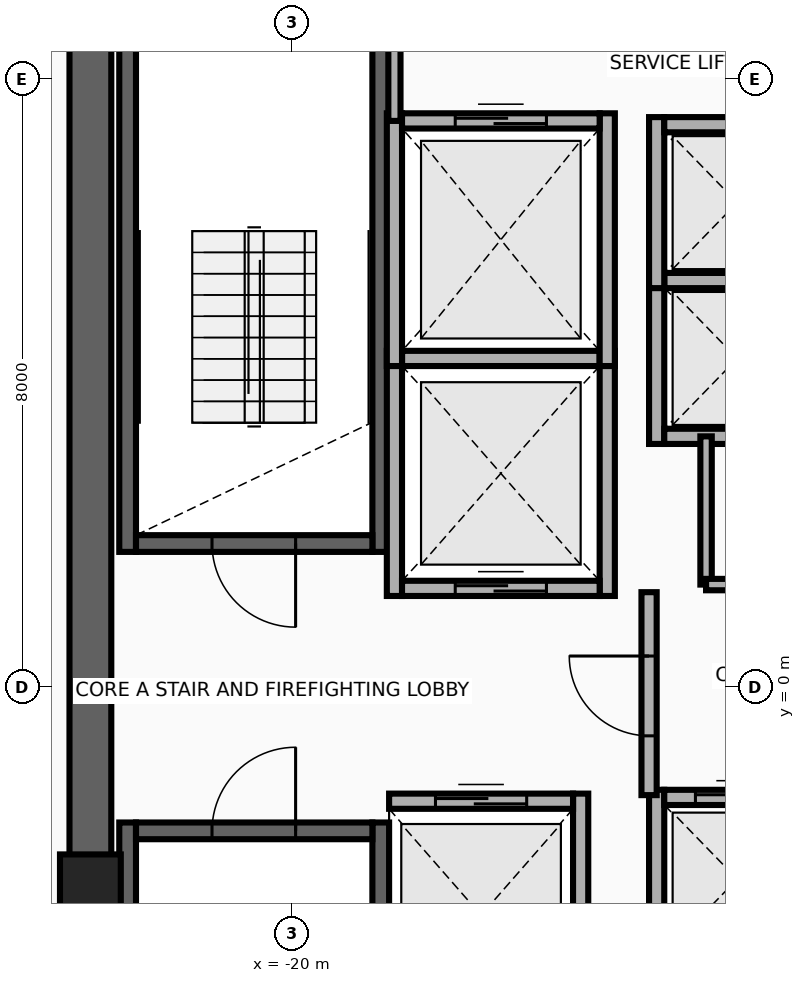
"""IFC4 building model, lengths in metres.
Left out: names, types, materials, properties, quantities, classifications, styles, units other than length and angle.
Written with IfcOpenShell. Run it as: python <this file> out.ifc"""

import sys

from ifc_helpers import new_model, si_unit, direction, frame, frame_2d, origin, origin_2d, place, context, subcontext, project, spatial, rectangle, extrude, source, transform, mapped, element, fill, save


model = new_model("IFC4")
c1 = context("Model", 3, precision=1e-05, world=origin(), true_north=direction((0.0, 1.0)))
c2 = subcontext(c1, "Body", "Model", "MODEL_VIEW")
j1 = project(units=[si_unit("LENGTHUNIT", "METRE"), si_unit("PLANEANGLEUNIT", "RADIAN")], contexts=[c1])
p1 = place(None, origin())
s1 = spatial("IfcSite", under=j1, at=p1, CompositionType="ELEMENT")
p2 = place(p1, origin())
s2 = spatial("IfcBuilding", under=s1, at=p2, CompositionType="ELEMENT")
p3 = place(p2, frame((0.0, 0.0, 251.0)))
s3 = spatial("IfcBuildingStorey", under=s2, at=p3, CompositionType="ELEMENT", Elevation=251.0)
for number, where, z_axis, x_axis in (
    (1, (-22.16, 1.78, 0.0), (0.0, 0.0, 1.0), (0.0, 1.0, 0.0)),
    (2, (-18.83, 1.78, 0.0), (0.0, 0.0, 1.0), (0.0, 1.0, 0.0)),
):
    element("IfcWall", number, at=place(p3, frame(where, z_axis=z_axis, x_axis=x_axis)), inside=s3, PredefinedType="SHEAR", context=c2, shape_type="SweptSolid", body=[
        extrude(rectangle(XDim=8.745, YDim=0.22, at=frame_2d((4.373, 0.0))), origin(), (0.0, 0.0, 1.0), 3.26),
    ])
p4 = place(p3, frame((-22.05, 1.89, 0.0), z_axis=(0.0, 0.0, 1.0), x_axis=(1.0, 0.0, 0.0)))
e3 = element("IfcWall", 3, at=p4, inside=s3, PredefinedType="SHEAR", context=c2, shape_type="SweptSolid", body=[
    extrude(rectangle(XDim=3.11, YDim=0.22, at=frame_2d((1.555, 0.0))), origin(), (0.0, 0.0, 1.0), 3.26),
])
p5 = place(p4, frame((1.0, 0.0, 0.0)))
e4 = element("IfcOpeningElement", 4, at=p5, cuts=e3, PredefinedType="OPENING", context=c2, shape_type="SweptSolid", body=[
    extrude(rectangle(XDim=1.1, YDim=2.15, at=frame_2d((0.55, 1.075))), frame((0.0, 0.125, 0.0), z_axis=(0.0, -1.0, 0.0), x_axis=(1.0, 0.0, 0.0)), (0.0, 0.0, 1.0), 0.25),
])
for number, where, z_axis, x_axis in (
    (5, (-22.16, -10.525, 0.0), (0.0, 0.0, 1.0), (0.0, 1.0, 0.0)),
    (6, (-18.83, -10.525, 0.0), (0.0, 0.0, 1.0), (0.0, 1.0, 0.0)),
):
    element("IfcWall", number, at=place(p3, frame(where, z_axis=z_axis, x_axis=x_axis)), inside=s3, PredefinedType="SHEAR", context=c2, shape_type="SweptSolid", body=[
        extrude(rectangle(XDim=8.745, YDim=0.22, at=frame_2d((4.373, 0.0))), origin(), (0.0, 0.0, 1.0), 3.26),
    ])
p6 = place(p3, frame((-22.05, -1.89, 0.0), z_axis=(0.0, 0.0, 1.0), x_axis=(1.0, 0.0, 0.0)))
e7 = element("IfcWall", 7, at=p6, inside=s3, PredefinedType="SHEAR", context=c2, shape_type="SweptSolid", body=[
    extrude(rectangle(XDim=3.11, YDim=0.22, at=frame_2d((1.555, 0.0))), origin(), (0.0, 0.0, 1.0), 3.26),
])
p7 = place(p6, frame((1.0, 0.0, 0.0)))
e8 = element("IfcOpeningElement", 8, at=p7, cuts=e7, PredefinedType="OPENING", context=c2, shape_type="SweptSolid", body=[
    extrude(rectangle(XDim=1.1, YDim=2.15, at=frame_2d((0.55, 1.075))), frame((0.0, 0.125, 0.0), z_axis=(0.0, -1.0, 0.0), x_axis=(1.0, 0.0, 0.0)), (0.0, 0.0, 1.0), 0.25),
])
p8 = place(p3, frame((-22.65, -11.075, 0.0), z_axis=(0.0, 0.0, 1.0), x_axis=(0.0, 1.0, 0.0)))
e9 = element("IfcWall", 9, at=p8, inside=s3, PredefinedType="SHEAR", context=c2, shape_type="SweptSolid", body=[
    extrude(rectangle(XDim=22.15, YDim=0.55, at=frame_2d((11.075, 0.0))), origin(), (0.0, 0.0, 1.0), 3.26),
])
m1 = source(origin(), c2, "Body", "SweptSolid", [
    extrude(rectangle(XDim=0.8, YDim=0.8, at=origin_2d()), origin(), (0.0, 0.0, 1.0), 3.5),
])
p9 = place(p3, frame((-22.65, -2.6, 0.0), z_axis=(0.0, 0.0, 1.0), x_axis=(1.0, 0.0, 0.0)))
e10 = element("IfcColumn", 10, at=p9, inside=s3, PredefinedType="COLUMN", context=c2, shape_type="MappedRepresentation", body=[
    mapped(m1, transform((0.0, 0.0, 0.0), x_axis=(1.0, 0.0, 0.0), y_axis=(0.0, 1.0, 0.0), z_axis=(0.0, 0.0, 1.0), scale=1.0)),
])
for number, where, z_axis, x_axis in (
    (11, (-18.65, 1.2, 0.0), (0.0, 0.0, 1.0), (0.0, 1.0, 0.0)),
    (12, (-15.85, 1.2, 0.0), (0.0, 0.0, 1.0), (0.0, 1.0, 0.0)),
):
    element("IfcWall", number, at=place(p3, frame(where, z_axis=z_axis, x_axis=x_axis)), inside=s3, PredefinedType="MOVABLE", context=c2, shape_type="SweptSolid", body=[
        extrude(rectangle(XDim=3.225, YDim=0.2, at=frame_2d((1.613, 0.0))), origin(), (0.0, 0.0, 1.0), 3.26),
    ])
p10 = place(p3, frame((-18.55, 1.3, 0.0), z_axis=(0.0, 0.0, 1.0), x_axis=(1.0, 0.0, 0.0)))
e13 = element("IfcWall", 13, at=p10, inside=s3, PredefinedType="MOVABLE", context=c2, shape_type="SweptSolid", body=[
    extrude(rectangle(XDim=2.6, YDim=0.2, at=frame_2d((1.3, 0.0))), origin(), (0.0, 0.0, 1.0), 3.26),
])
p11 = place(p10, frame((0.7, 0.0, 0.0)))
e14 = element("IfcOpeningElement", 14, at=p11, cuts=e13, PredefinedType="OPENING", context=c2, shape_type="SweptSolid", body=[
    extrude(rectangle(XDim=1.2, YDim=2.1, at=frame_2d((0.6, 1.05))), frame((0.0, 0.115, 0.0), z_axis=(0.0, -1.0, 0.0), x_axis=(1.0, 0.0, 0.0)), (0.0, 0.0, 1.0), 0.23),
])
p12 = place(p3, frame((-18.55, 4.325, 0.0), z_axis=(0.0, 0.0, 1.0), x_axis=(1.0, 0.0, 0.0)))
e15 = element("IfcWall", 15, at=p12, inside=s3, PredefinedType="MOVABLE", context=c2, shape_type="SweptSolid", body=[
    extrude(rectangle(XDim=2.6, YDim=0.2, at=frame_2d((1.3, 0.0))), origin(), (0.0, 0.0, 1.0), 3.26),
])
p13 = place(p3, frame((-16.2, -4.6, 0.0), z_axis=(0.0, 0.0, 1.0), x_axis=(0.0, 1.0, 0.0)))
e16 = element("IfcWall", 16, at=p13, inside=s3, PredefinedType="MOVABLE", context=c2, shape_type="SweptSolid", body=[
    extrude(rectangle(XDim=3.2, YDim=0.2, at=frame_2d((1.6, 0.0))), origin(), (0.0, 0.0, 1.0), 3.26),
])
p14 = place(p3, frame((-18.72, -1.5, 0.0), z_axis=(0.0, 0.0, 1.0), x_axis=(1.0, 0.0, 0.0)))
e17 = element("IfcWall", 17, at=p14, inside=s3, PredefinedType="MOVABLE", context=c2, shape_type="SweptSolid", body=[
    extrude(rectangle(XDim=2.42, YDim=0.2, at=frame_2d((1.21, 0.0))), origin(), (0.0, 0.0, 1.0), 3.26),
])
p15 = place(p14, frame((0.61, 0.0, 0.0)))
e18 = element("IfcOpeningElement", 18, at=p15, cuts=e17, PredefinedType="OPENING", context=c2, shape_type="SweptSolid", body=[
    extrude(rectangle(XDim=1.2, YDim=2.1, at=frame_2d((0.6, 1.05))), frame((0.0, 0.115, 0.0), z_axis=(0.0, -1.0, 0.0), x_axis=(1.0, 0.0, 0.0)), (0.0, 0.0, 1.0), 0.23),
])
for number, where, z_axis, x_axis in (
    (19, (-18.65, 4.225, 0.0), (0.0, 0.0, 1.0), (0.0, 1.0, 0.0)),
    (20, (-15.85, 4.225, 0.0), (0.0, 0.0, 1.0), (0.0, 1.0, 0.0)),
):
    element("IfcWall", number, at=place(p3, frame(where, z_axis=z_axis, x_axis=x_axis)), inside=s3, PredefinedType="MOVABLE", context=c2, shape_type="SweptSolid", body=[
        extrude(rectangle(XDim=3.325, YDim=0.2, at=frame_2d((1.663, 0.0))), origin(), (0.0, 0.0, 1.0), 3.26),
    ])
p16 = place(p3, frame((-18.55, 7.45, 0.0), z_axis=(0.0, 0.0, 1.0), x_axis=(1.0, 0.0, 0.0)))
e21 = element("IfcWall", 21, at=p16, inside=s3, PredefinedType="MOVABLE", context=c2, shape_type="SweptSolid", body=[
    extrude(rectangle(XDim=2.6, YDim=0.2, at=frame_2d((1.3, 0.0))), origin(), (0.0, 0.0, 1.0), 3.26),
])
p17 = place(p16, frame((0.7, 0.0, 0.0)))
e22 = element("IfcOpeningElement", 22, at=p17, cuts=e21, PredefinedType="OPENING", context=c2, shape_type="SweptSolid", body=[
    extrude(rectangle(XDim=1.2, YDim=2.1, at=frame_2d((0.6, 1.05))), frame((0.0, 0.115, 0.0), z_axis=(0.0, -1.0, 0.0), x_axis=(1.0, 0.0, 0.0)), (0.0, 0.0, 1.0), 0.23),
])
p18 = place(p3, frame((-15.2, 3.2, 0.0), z_axis=(0.0, 0.0, 1.0), x_axis=(0.0, 1.0, 0.0)))
e23 = element("IfcWall", 23, at=p18, inside=s3, PredefinedType="MOVABLE", context=c2, shape_type="SweptSolid", body=[
    extrude(rectangle(XDim=2.25, YDim=0.2, at=frame_2d((1.125, 0.0))), origin(), (0.0, 0.0, 1.0), 3.26),
])
for number, where, z_axis, x_axis in (
    (24, (-15.1, 3.3, 0.0), (0.0, 0.0, 1.0), (1.0, 0.0, 0.0)),
    (25, (-15.1, 5.35, 0.0), (0.0, 0.0, 1.0), (1.0, 0.0, 0.0)),
):
    element("IfcWall", number, at=place(p3, frame(where, z_axis=z_axis, x_axis=x_axis)), inside=s3, PredefinedType="MOVABLE", context=c2, shape_type="SweptSolid", body=[
        extrude(rectangle(XDim=1.92, YDim=0.2, at=frame_2d((0.96, 0.0))), origin(), (0.0, 0.0, 1.0), 3.26),
    ])
p19 = place(p3, frame((-15.2, 5.25, 0.0), z_axis=(0.0, 0.0, 1.0), x_axis=(0.0, 1.0, 0.0)))
e26 = element("IfcWall", 26, at=p19, inside=s3, PredefinedType="MOVABLE", context=c2, shape_type="SweptSolid", body=[
    extrude(rectangle(XDim=2.25, YDim=0.2, at=frame_2d((1.125, 0.0))), origin(), (0.0, 0.0, 1.0), 3.26),
])
p20 = place(p3, frame((-15.1, 7.4, 0.0), z_axis=(0.0, 0.0, 1.0), x_axis=(1.0, 0.0, 0.0)))
e27 = element("IfcWall", 27, at=p20, inside=s3, PredefinedType="MOVABLE", context=c2, shape_type="SweptSolid", body=[
    extrude(rectangle(XDim=1.92, YDim=0.2, at=frame_2d((0.96, 0.0))), origin(), (0.0, 0.0, 1.0), 3.26),
])
p21 = place(p3, frame((-15.2, -3.7, 0.0), z_axis=(0.0, 0.0, 1.0), x_axis=(0.0, 1.0, 0.0)))
e28 = element("IfcWall", 28, at=p21, inside=s3, PredefinedType="MOVABLE", context=c2, shape_type="SweptSolid", body=[
    extrude(rectangle(XDim=2.35, YDim=0.2, at=frame_2d((1.175, 0.0))), origin(), (0.0, 0.0, 1.0), 3.26),
])
p22 = place(p3, frame((-15.1, -1.45, 0.0), z_axis=(0.0, 0.0, 1.0), x_axis=(1.0, 0.0, 0.0)))
e29 = element("IfcWall", 29, at=p22, inside=s3, PredefinedType="MOVABLE", context=c2, shape_type="SweptSolid", body=[
    extrude(rectangle(XDim=1.92, YDim=0.2, at=frame_2d((0.96, 0.0))), origin(), (0.0, 0.0, 1.0), 3.26),
])
p23 = place(p22, frame((0.41, 0.0, 0.0)))
e30 = element("IfcOpeningElement", 30, at=p23, cuts=e29, PredefinedType="OPENING", context=c2, shape_type="SweptSolid", body=[
    extrude(rectangle(XDim=1.1, YDim=2.1, at=frame_2d((0.55, 1.05))), frame((0.0, 0.115, 0.0), z_axis=(0.0, -1.0, 0.0), x_axis=(1.0, 0.0, 0.0)), (0.0, 0.0, 1.0), 0.23),
])
p24 = place(p3, frame((-15.3, -1.42, 0.0), z_axis=(0.0, 0.0, 1.0), x_axis=(0.0, 1.0, 0.0)))
e31 = element("IfcWall", 31, at=p24, inside=s3, PredefinedType="PARTITIONING", context=c2, shape_type="SweptSolid", body=[
    extrude(rectangle(XDim=2.67, YDim=0.2, at=frame_2d((1.335, 0.0))), origin(), (0.0, 0.0, 1.0), 3.26),
])
p25 = place(p24, frame((0.78, 0.0, 0.0)))
e32 = element("IfcOpeningElement", 32, at=p25, cuts=e31, PredefinedType="OPENING", context=c2, shape_type="SweptSolid", body=[
    extrude(rectangle(XDim=1.05, YDim=2.15, at=frame_2d((0.525, 1.075))), frame((0.0, 0.115, 0.0), z_axis=(0.0, -1.0, 0.0), x_axis=(1.0, 0.0, 0.0)), (0.0, 0.0, 1.0), 0.23),
])
p26 = place(p3, frame((-18.65, 7.45, 0.0), z_axis=(0.0, 0.0, 1.0), x_axis=(0.0, 1.0, 0.0)))
e33 = element("IfcWall", 33, at=p26, inside=s3, PredefinedType="PARTITIONING", context=c2, shape_type="SweptSolid", body=[
    extrude(rectangle(XDim=2.93, YDim=0.16, at=frame_2d((1.465, 0.0))), origin(), (0.0, 0.0, 1.0), 3.26),
])
p27 = place(p3, frame((-14.55, 1.35, 0.0), z_axis=(0.0, 0.0, 1.0), x_axis=(0.0, 1.0, 0.0)))
e34 = element("IfcWall", 34, at=p27, inside=s3, PredefinedType="PARTITIONING", context=c2, shape_type="SweptSolid", body=[
    extrude(rectangle(XDim=1.95, YDim=0.15, at=frame_2d((0.975, 0.0))), origin(), (0.0, 0.0, 1.0), 3.26),
])
p28 = place(p3, frame((-14.55, 1.35, 0.0), z_axis=(0.0, 0.0, 1.0), x_axis=(1.0, 0.0, 0.0)))
e35 = element("IfcWall", 35, at=p28, inside=s3, PredefinedType="PARTITIONING", context=c2, shape_type="SweptSolid", body=[
    extrude(rectangle(XDim=1.4, YDim=0.15, at=frame_2d((0.7, 0.0))), origin(), (0.0, 0.0, 1.0), 3.26),
])
p29 = place(p28, frame((0.275, 0.0, 0.0)))
e36 = element("IfcOpeningElement", 36, at=p29, cuts=e35, PredefinedType="OPENING", context=c2, shape_type="SweptSolid", body=[
    extrude(rectangle(XDim=0.85, YDim=2.05, at=frame_2d((0.425, 1.025))), frame((0.0, 0.09, 0.0), z_axis=(0.0, -1.0, 0.0), x_axis=(1.0, 0.0, 0.0)), (0.0, 0.0, 1.0), 0.18),
])
p30 = place(p11, origin())
e37 = element("IfcDoor", 37, at=p30, inside=s3, OperationType="DOUBLE_DOOR_SLIDING", PredefinedType="DOOR", context=c2, shape_type="SweptSolid", body=[
    extrude(rectangle(XDim=1.2, YDim=2.1, at=frame_2d((0.6, 1.05))), frame((0.0, 0.025, 0.0), z_axis=(0.0, -1.0, 0.0), x_axis=(1.0, 0.0, 0.0)), (0.0, 0.0, 1.0), 0.05),
])
fill(e14, e37)
p31 = place(p15, origin())
e38 = element("IfcDoor", 38, at=p31, inside=s3, OperationType="DOUBLE_DOOR_SLIDING", PredefinedType="DOOR", context=c2, shape_type="SweptSolid", body=[
    extrude(rectangle(XDim=1.2, YDim=2.1, at=frame_2d((0.6, 1.05))), frame((0.0, 0.025, 0.0), z_axis=(0.0, -1.0, 0.0), x_axis=(1.0, 0.0, 0.0)), (0.0, 0.0, 1.0), 0.05),
])
fill(e18, e38)
p32 = place(p17, origin())
e39 = element("IfcDoor", 39, at=p32, inside=s3, OperationType="DOUBLE_DOOR_SLIDING", PredefinedType="DOOR", context=c2, shape_type="SweptSolid", body=[
    extrude(rectangle(XDim=1.2, YDim=2.1, at=frame_2d((0.6, 1.05))), frame((0.0, 0.025, 0.0), z_axis=(0.0, -1.0, 0.0), x_axis=(1.0, 0.0, 0.0)), (0.0, 0.0, 1.0), 0.05),
])
fill(e22, e39)
p33 = place(p23, origin())
e40 = element("IfcDoor", 40, at=p33, inside=s3, OperationType="DOUBLE_DOOR_SLIDING", PredefinedType="DOOR", context=c2, shape_type="SweptSolid", body=[
    extrude(rectangle(XDim=1.1, YDim=2.1, at=frame_2d((0.55, 1.05))), frame((0.0, 0.025, 0.0), z_axis=(0.0, -1.0, 0.0), x_axis=(1.0, 0.0, 0.0)), (0.0, 0.0, 1.0), 0.05),
])
fill(e30, e40)
p34 = place(p25, origin())
e41 = element("IfcDoor", 41, at=p34, inside=s3, OperationType="SINGLE_SWING_RIGHT", PredefinedType="DOOR", context=c2, shape_type="SweptSolid", body=[
    extrude(rectangle(XDim=1.05, YDim=2.15, at=frame_2d((0.525, 1.075))), frame((0.0, 0.025, 0.0), z_axis=(0.0, -1.0, 0.0), x_axis=(1.0, 0.0, 0.0)), (0.0, 0.0, 1.0), 0.05),
])
fill(e32, e41)
p35 = place(p5, frame((1.1, 0.0, 0.0), z_axis=(0.0, 0.0, 1.0), x_axis=(-1.0, 0.0, 0.0)))
e42 = element("IfcDoor", 42, at=p35, inside=s3, OperationType="SINGLE_SWING_LEFT", PredefinedType="DOOR", context=c2, shape_type="SweptSolid", body=[
    extrude(rectangle(XDim=1.1, YDim=2.15, at=frame_2d((0.55, 1.075))), frame((0.0, 0.025, 0.0), z_axis=(0.0, -1.0, 0.0), x_axis=(1.0, 0.0, 0.0)), (0.0, 0.0, 1.0), 0.05),
])
fill(e4, e42)
p36 = place(p7, origin())
e43 = element("IfcDoor", 43, at=p36, inside=s3, OperationType="SINGLE_SWING_RIGHT", PredefinedType="DOOR", context=c2, shape_type="SweptSolid", body=[
    extrude(rectangle(XDim=1.1, YDim=2.15, at=frame_2d((0.55, 1.075))), frame((0.0, 0.025, 0.0), z_axis=(0.0, -1.0, 0.0), x_axis=(1.0, 0.0, 0.0)), (0.0, 0.0, 1.0), 0.05),
])
fill(e8, e43)
save(model, sys.argv[1])
